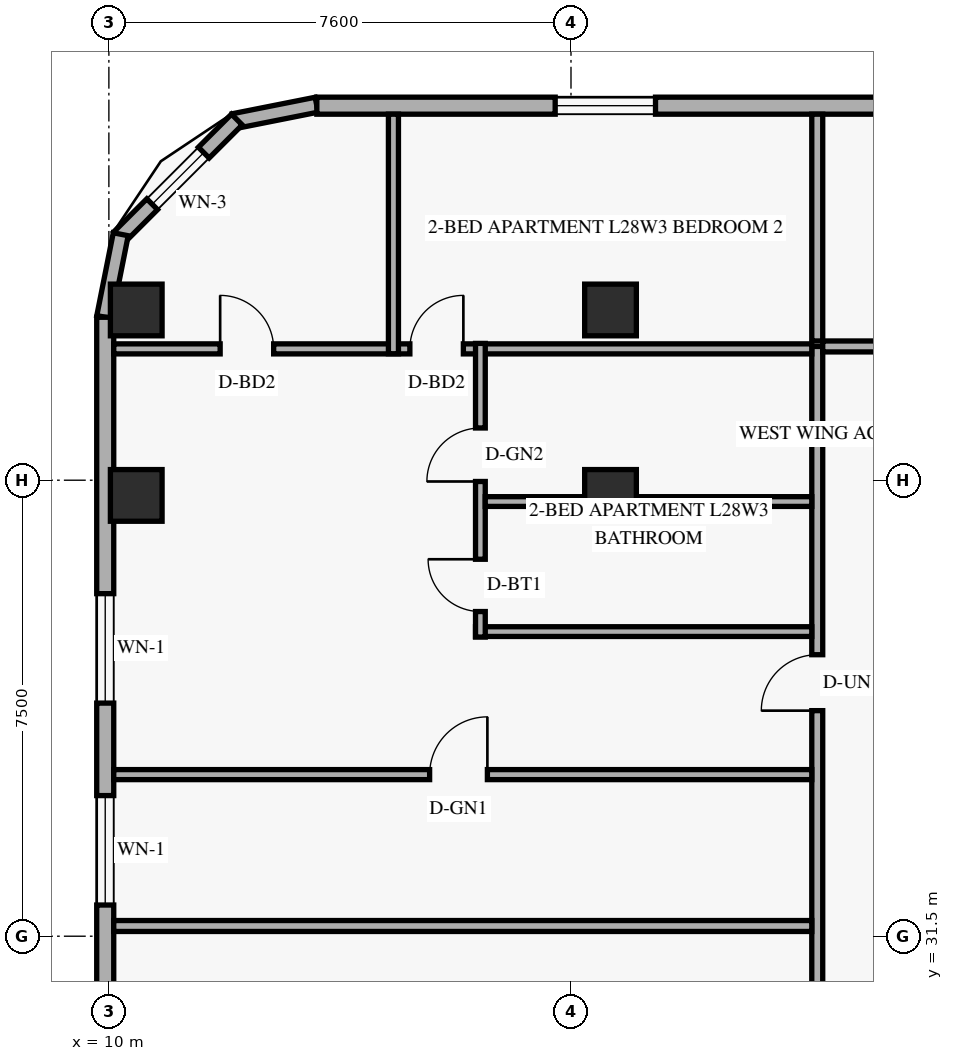
"""IFC4 building model, lengths in metres.
Left out: names, types, materials, properties, quantities, classifications, styles, units other than length and angle.
Written with IfcOpenShell. Run it as: python <this file> out.ifc"""

import sys

from ifc_helpers import new_model, si_unit, direction, frame, frame_2d, origin, origin_2d, place, context, subcontext, project, spatial, rectangle, extrude, element, fill, save


model = new_model("IFC4")
c1 = context("Model", 3, precision=1e-05, world=origin(), true_north=direction((0.0, 1.0)))
c2 = subcontext(c1, "Body", "Model", "MODEL_VIEW")
j1 = project(units=[si_unit("LENGTHUNIT", "METRE"), si_unit("PLANEANGLEUNIT", "RADIAN")], contexts=[c1])
p1 = place(None, origin())
s1 = spatial("IfcSite", under=j1, at=p1, CompositionType="ELEMENT")
p2 = place(p1, origin())
s2 = spatial("IfcBuilding", under=s1, at=p2, CompositionType="ELEMENT")
p3 = place(p2, frame((0.0, 0.0, 109.8)))
s3 = spatial("IfcBuildingStorey", under=s2, at=p3, CompositionType="ELEMENT", Elevation=109.8)
for number, where, z_axis, x_axis in (
    (1, (10.45, 38.75, 0.0), (0.0, 0.0, 1.0), (1.0, 0.0, 0.0)),
    (2, (10.45, 41.8, 0.0), (0.0, 0.0, 1.0), (1.0, 0.0, 0.0)),
    (3, (18.25, 38.75, 0.0), (0.0, 0.0, 1.0), (1.0, 0.0, 0.0)),
    (4, (18.25, 41.8, 0.0), (0.0, 0.0, 1.0), (1.0, 0.0, 0.0)),
):
    element("IfcColumn", number, at=place(p3, frame(where, z_axis=z_axis, x_axis=x_axis)), inside=s3, PredefinedType="COLUMN", context=c2, shape_type="SweptSolid", body=[
        extrude(rectangle(XDim=0.85, YDim=0.85, at=origin_2d()), origin(), (0.0, 0.0, 1.0), 3.6),
    ])
p4 = place(p3, frame((13.417, 45.176, 0.0), z_axis=(0.0, 0.0, 1.0), x_axis=(-0.980809899341, -0.19496651342, 0.0)))
e5 = element("IfcWall", 5, at=p4, inside=s3, PredefinedType="SOLIDWALL", context=c2, shape_type="SweptSolid", body=[
    extrude(rectangle(XDim=1.389, YDim=0.25, at=frame_2d((0.694, 0.0))), origin(), (0.0, 0.0, 1.0), 3.36),
])
p5 = place(p3, frame((12.105, 44.932, 0.0), z_axis=(0.0, 0.0, 1.0), x_axis=(-0.707151344399, -0.707062215165, 0.0)))
e6 = element("IfcWall", 6, at=p5, inside=s3, PredefinedType="SOLIDWALL", context=c2, shape_type="SweptSolid", body=[
    extrude(rectangle(XDim=2.739, YDim=0.25, at=frame_2d((1.37, 0.0))), origin(), (0.0, 0.0, 1.0), 3.36),
])
p6 = place(p5, frame((0.77, 0.0, 0.85)))
e7 = element("IfcOpeningElement", 7, at=p6, cuts=e6, PredefinedType="OPENING", context=c2, shape_type="SweptSolid", body=[
    extrude(rectangle(XDim=1.2, YDim=1.5, at=frame_2d((0.6, 0.75))), frame((0.0, 0.135, 0.0), z_axis=(0.0, -1.0, 0.0), x_axis=(1.0, 0.0, 0.0)), (0.0, 0.0, 1.0), 0.27),
])
p7 = place(p3, frame((10.195, 43.045, 0.0), z_axis=(0.0, 0.0, 1.0), x_axis=(-0.195000137217, -0.980803214965, 0.0)))
e8 = element("IfcWall", 8, at=p7, inside=s3, PredefinedType="SOLIDWALL", context=c2, shape_type="SweptSolid", body=[
    extrude(rectangle(XDim=1.388, YDim=0.25, at=frame_2d((0.694, 0.0))), origin(), (0.0, 0.0, 1.0), 3.36),
])
p8 = place(p3, frame((49.98, 45.16, 0.0), z_axis=(0.0, 0.0, 1.0), x_axis=(-1.0, 0.0, 0.0)))
e9 = element("IfcWall", 9, at=p8, inside=s3, PredefinedType="SOLIDWALL", context=c2, shape_type="SweptSolid", body=[
    extrude(rectangle(XDim=36.56, YDim=0.28, at=frame_2d((18.28, 0.0))), origin(), (0.0, 0.0, 1.0), 3.36),
])
p9 = place(p8, frame((30.99, 0.0, 0.85)))
e10 = element("IfcOpeningElement", 10, at=p9, cuts=e9, PredefinedType="OPENING", context=c2, shape_type="SweptSolid", body=[
    extrude(rectangle(XDim=1.65, YDim=1.6, at=frame_2d((0.825, 0.8))), frame((0.0, 0.15, 0.0), z_axis=(0.0, -1.0, 0.0), x_axis=(1.0, 0.0, 0.0)), (0.0, 0.0, 1.0), 0.3),
])
p10 = place(p8, frame((23.13, 0.0, 0.85)))
e11 = element("IfcOpeningElement", 11, at=p10, cuts=e9, PredefinedType="OPENING", context=c2, shape_type="SweptSolid", body=[
    extrude(rectangle(XDim=1.65, YDim=1.6, at=frame_2d((0.825, 0.8))), frame((0.0, 0.15, 0.0), z_axis=(0.0, -1.0, 0.0), x_axis=(1.0, 0.0, 0.0)), (0.0, 0.0, 1.0), 0.3),
])
p11 = place(p8, frame((16.245, 0.0, 0.85)))
e12 = element("IfcOpeningElement", 12, at=p11, cuts=e9, PredefinedType="OPENING", context=c2, shape_type="SweptSolid", body=[
    extrude(rectangle(XDim=1.65, YDim=1.6, at=frame_2d((0.825, 0.8))), frame((0.0, 0.15, 0.0), z_axis=(0.0, -1.0, 0.0), x_axis=(1.0, 0.0, 0.0)), (0.0, 0.0, 1.0), 0.3),
])
p12 = place(p8, frame((10.64, 0.0, 0.85)))
e13 = element("IfcOpeningElement", 13, at=p12, cuts=e9, PredefinedType="OPENING", context=c2, shape_type="SweptSolid", body=[
    extrude(rectangle(XDim=1.65, YDim=1.6, at=frame_2d((0.825, 0.8))), frame((0.0, 0.15, 0.0), z_axis=(0.0, -1.0, 0.0), x_axis=(1.0, 0.0, 0.0)), (0.0, 0.0, 1.0), 0.3),
])
p13 = place(p8, frame((5.55, 0.0, 0.85)))
e14 = element("IfcOpeningElement", 14, at=p13, cuts=e9, PredefinedType="OPENING", context=c2, shape_type="SweptSolid", body=[
    extrude(rectangle(XDim=1.65, YDim=1.6, at=frame_2d((0.825, 0.8))), frame((0.0, 0.15, 0.0), z_axis=(0.0, -1.0, 0.0), x_axis=(1.0, 0.0, 0.0)), (0.0, 0.0, 1.0), 0.3),
])
p14 = place(p8, frame((2.88, 0.0, 0.85)))
e15 = element("IfcOpeningElement", 15, at=p14, cuts=e9, PredefinedType="OPENING", context=c2, shape_type="SweptSolid", body=[
    extrude(rectangle(XDim=1.2, YDim=1.5, at=frame_2d((0.6, 0.75))), frame((0.0, 0.15, 0.0), z_axis=(0.0, -1.0, 0.0), x_axis=(1.0, 0.0, 0.0)), (0.0, 0.0, 1.0), 0.3),
])
p15 = place(p8, frame((0.465, 0.0, 0.85)))
e16 = element("IfcOpeningElement", 16, at=p15, cuts=e9, PredefinedType="OPENING", context=c2, shape_type="SweptSolid", body=[
    extrude(rectangle(XDim=1.65, YDim=1.6, at=frame_2d((0.825, 0.8))), frame((0.0, 0.15, 0.0), z_axis=(0.0, -1.0, 0.0), x_axis=(1.0, 0.0, 0.0)), (0.0, 0.0, 1.0), 0.3),
])
p16 = place(p3, frame((9.94, 41.68, 0.0), z_axis=(0.0, 0.0, 1.0), x_axis=(0.0, -1.0, 0.0)))
e17 = element("IfcWall", 17, at=p16, inside=s3, PredefinedType="SOLIDWALL", context=c2, shape_type="SweptSolid", body=[
    extrude(rectangle(XDim=35.36, YDim=0.28, at=frame_2d((17.68, 0.0))), origin(), (0.0, 0.0, 1.0), 3.36),
])
p17 = place(p16, frame((28.691, 0.0, 0.85)))
e18 = element("IfcOpeningElement", 18, at=p17, cuts=e17, PredefinedType="OPENING", context=c2, shape_type="SweptSolid", body=[
    extrude(rectangle(XDim=1.8, YDim=1.6, at=frame_2d((0.9, 0.8))), frame((0.0, 0.15, 0.0), z_axis=(0.0, -1.0, 0.0), x_axis=(1.0, 0.0, 0.0)), (0.0, 0.0, 1.0), 0.3),
])
p18 = place(p16, frame((24.981, 0.0, 0.85)))
e19 = element("IfcOpeningElement", 19, at=p18, cuts=e17, PredefinedType="OPENING", context=c2, shape_type="SweptSolid", body=[
    extrude(rectangle(XDim=1.8, YDim=1.6, at=frame_2d((0.9, 0.8))), frame((0.0, 0.15, 0.0), z_axis=(0.0, -1.0, 0.0), x_axis=(1.0, 0.0, 0.0)), (0.0, 0.0, 1.0), 0.3),
])
p19 = place(p16, frame((20.248, 0.0, 0.85)))
e20 = element("IfcOpeningElement", 20, at=p19, cuts=e17, PredefinedType="OPENING", context=c2, shape_type="SweptSolid", body=[
    extrude(rectangle(XDim=1.8, YDim=1.6, at=frame_2d((0.9, 0.8))), frame((0.0, 0.15, 0.0), z_axis=(0.0, -1.0, 0.0), x_axis=(1.0, 0.0, 0.0)), (0.0, 0.0, 1.0), 0.3),
])
p20 = place(p16, frame((14.363, 0.0, 0.85)))
e21 = element("IfcOpeningElement", 21, at=p20, cuts=e17, PredefinedType="OPENING", context=c2, shape_type="SweptSolid", body=[
    extrude(rectangle(XDim=1.8, YDim=1.6, at=frame_2d((0.9, 0.8))), frame((0.0, 0.15, 0.0), z_axis=(0.0, -1.0, 0.0), x_axis=(1.0, 0.0, 0.0)), (0.0, 0.0, 1.0), 0.3),
])
p21 = place(p16, frame((7.867, 0.0, 0.85)))
e22 = element("IfcOpeningElement", 22, at=p21, cuts=e17, PredefinedType="OPENING", context=c2, shape_type="SweptSolid", body=[
    extrude(rectangle(XDim=1.8, YDim=1.6, at=frame_2d((0.9, 0.8))), frame((0.0, 0.15, 0.0), z_axis=(0.0, -1.0, 0.0), x_axis=(1.0, 0.0, 0.0)), (0.0, 0.0, 1.0), 0.3),
])
p22 = place(p16, frame((4.546, 0.0, 0.85)))
e23 = element("IfcOpeningElement", 23, at=p22, cuts=e17, PredefinedType="OPENING", context=c2, shape_type="SweptSolid", body=[
    extrude(rectangle(XDim=1.8, YDim=1.6, at=frame_2d((0.9, 0.8))), frame((0.0, 0.15, 0.0), z_axis=(0.0, -1.0, 0.0), x_axis=(1.0, 0.0, 0.0)), (0.0, 0.0, 1.0), 0.3),
])
p23 = place(p3, frame((21.65, 6.8, 0.0), z_axis=(0.0, 0.0, 1.0), x_axis=(0.0, 1.0, 0.0)))
e24 = element("IfcWall", 24, at=p23, inside=s3, PredefinedType="STANDARD", context=c2, shape_type="SweptSolid", body=[
    extrude(rectangle(XDim=34.4, YDim=0.18, at=frame_2d((17.2, 0.0))), origin(), (0.0, 0.0, 1.0), 2.731),
])
p24 = place(p23, frame((4.785, 0.0, 0.0)))
e25 = element("IfcOpeningElement", 25, at=p24, cuts=e24, PredefinedType="OPENING", context=c2, shape_type="SweptSolid", body=[
    extrude(rectangle(XDim=0.92, YDim=2.15, at=frame_2d((0.46, 1.075))), frame((0.0, 0.1, 0.0), z_axis=(0.0, -1.0, 0.0), x_axis=(1.0, 0.0, 0.0)), (0.0, 0.0, 1.0), 0.2),
])
p25 = place(p23, frame((15.384, 0.0, 0.0)))
e26 = element("IfcOpeningElement", 26, at=p25, cuts=e24, PredefinedType="OPENING", context=c2, shape_type="SweptSolid", body=[
    extrude(rectangle(XDim=0.92, YDim=2.15, at=frame_2d((0.46, 1.075))), frame((0.0, 0.1, 0.0), z_axis=(0.0, -1.0, 0.0), x_axis=(1.0, 0.0, 0.0)), (0.0, 0.0, 1.0), 0.2),
])
p26 = place(p23, frame((28.41, 0.0, 0.0)))
e27 = element("IfcOpeningElement", 27, at=p26, cuts=e24, PredefinedType="OPENING", context=c2, shape_type="SweptSolid", body=[
    extrude(rectangle(XDim=0.92, YDim=2.15, at=frame_2d((0.46, 1.075))), frame((0.0, 0.1, 0.0), z_axis=(0.0, -1.0, 0.0), x_axis=(1.0, 0.0, 0.0)), (0.0, 0.0, 1.0), 0.2),
])
p27 = place(p3, frame((21.74, 41.2, 0.0), z_axis=(0.0, 0.0, 1.0), x_axis=(1.0, 0.0, 0.0)))
e28 = element("IfcWall", 28, at=p27, inside=s3, PredefinedType="STANDARD", context=c2, shape_type="SweptSolid", body=[
    extrude(rectangle(XDim=13.68, YDim=0.18, at=frame_2d((6.84, 0.0))), origin(), (0.0, 0.0, 1.0), 2.731),
])
p28 = place(p27, frame((3.09, 0.0, 0.0)))
e29 = element("IfcOpeningElement", 29, at=p28, cuts=e28, PredefinedType="OPENING", context=c2, shape_type="SweptSolid", body=[
    extrude(rectangle(XDim=0.95, YDim=2.15, at=frame_2d((0.475, 1.075))), frame((0.0, 0.1, 0.0), z_axis=(0.0, -1.0, 0.0), x_axis=(1.0, 0.0, 0.0)), (0.0, 0.0, 1.0), 0.2),
])
p29 = place(p27, frame((10.11, 0.0, 0.0)))
e30 = element("IfcOpeningElement", 30, at=p29, cuts=e28, PredefinedType="OPENING", context=c2, shape_type="SweptSolid", body=[
    extrude(rectangle(XDim=0.95, YDim=2.15, at=frame_2d((0.475, 1.075))), frame((0.0, 0.1, 0.0), z_axis=(0.0, -1.0, 0.0), x_axis=(1.0, 0.0, 0.0)), (0.0, 0.0, 1.0), 0.2),
])
p30 = place(p3, frame((21.65, 41.29, 0.0), z_axis=(0.0, 0.0, 1.0), x_axis=(0.0, 1.0, 0.0)))
e31 = element("IfcWall", 31, at=p30, inside=s3, PredefinedType="PARTITIONING", context=c2, shape_type="SweptSolid", body=[
    extrude(rectangle(XDim=3.73, YDim=0.18, at=frame_2d((1.865, 0.0))), origin(), (0.0, 0.0, 1.0), 2.809),
])
p31 = place(p3, frame((10.08, 31.668, 0.0), z_axis=(0.0, 0.0, 1.0), x_axis=(1.0, 0.0, 0.0)))
e32 = element("IfcWall", 32, at=p31, inside=s3, PredefinedType="PARTITIONING", context=c2, shape_type="SweptSolid", body=[
    extrude(rectangle(XDim=11.48, YDim=0.18, at=frame_2d((5.74, 0.0))), origin(), (0.0, 0.0, 1.0), 2.731),
])
p32 = place(p3, frame((10.08, 41.16, 0.0), z_axis=(0.0, 0.0, 1.0), x_axis=(1.0, 0.0, 0.0)))
e33 = element("IfcWall", 33, at=p32, inside=s3, PredefinedType="PARTITIONING", context=c2, shape_type="SweptSolid", body=[
    extrude(rectangle(XDim=11.48, YDim=0.165, at=frame_2d((5.74, 0.0))), origin(), (0.0, 0.0, 1.0), 2.731),
])
p33 = place(p32, frame((1.75, 0.0, 0.0)))
e34 = element("IfcOpeningElement", 34, at=p33, cuts=e33, PredefinedType="OPENING", context=c2, shape_type="SweptSolid", body=[
    extrude(rectangle(XDim=0.88, YDim=2.14, at=frame_2d((0.44, 1.07))), frame((0.0, 0.093, 0.0), z_axis=(0.0, -1.0, 0.0), x_axis=(1.0, 0.0, 0.0)), (0.0, 0.0, 1.0), 0.185),
])
p34 = place(p32, frame((4.87, 0.0, 0.0)))
e35 = element("IfcOpeningElement", 35, at=p34, cuts=e33, PredefinedType="OPENING", context=c2, shape_type="SweptSolid", body=[
    extrude(rectangle(XDim=0.88, YDim=2.14, at=frame_2d((0.44, 1.07))), frame((0.0, 0.093, 0.0), z_axis=(0.0, -1.0, 0.0), x_axis=(1.0, 0.0, 0.0)), (0.0, 0.0, 1.0), 0.185),
])
p35 = place(p3, frame((16.03, 36.51, 0.0), z_axis=(0.0, 0.0, 1.0), x_axis=(1.0, 0.0, 0.0)))
e36 = element("IfcWall", 36, at=p35, inside=s3, PredefinedType="PLUMBINGWALL", context=c2, shape_type="SweptSolid", body=[
    extrude(rectangle(XDim=5.53, YDim=0.16, at=frame_2d((2.765, 0.0))), origin(), (0.0, 0.0, 1.0), 2.731),
])
p36 = place(p3, frame((16.11, 36.42, 0.0), z_axis=(0.0, 0.0, 1.0), x_axis=(0.0, 1.0, 0.0)))
e37 = element("IfcWall", 37, at=p36, inside=s3, PredefinedType="PLUMBINGWALL", context=c2, shape_type="SweptSolid", body=[
    extrude(rectangle(XDim=4.83, YDim=0.16, at=frame_2d((2.415, 0.0))), origin(), (0.0, 0.0, 1.0), 2.731),
])
p37 = place(p36, frame((0.42, 0.0, 0.0)))
e38 = element("IfcOpeningElement", 38, at=p37, cuts=e37, PredefinedType="OPENING", context=c2, shape_type="SweptSolid", body=[
    extrude(rectangle(XDim=0.86, YDim=2.12, at=frame_2d((0.43, 1.06))), frame((0.0, 0.09, 0.0), z_axis=(0.0, -1.0, 0.0), x_axis=(1.0, 0.0, 0.0)), (0.0, 0.0, 1.0), 0.18),
])
p38 = place(p36, frame((2.559, 0.0, 0.0)))
e39 = element("IfcOpeningElement", 39, at=p38, cuts=e37, PredefinedType="OPENING", context=c2, shape_type="SweptSolid", body=[
    extrude(rectangle(XDim=0.88, YDim=2.12, at=frame_2d((0.44, 1.06))), frame((0.0, 0.09, 0.0), z_axis=(0.0, -1.0, 0.0), x_axis=(1.0, 0.0, 0.0)), (0.0, 0.0, 1.0), 0.18),
])
p39 = place(p3, frame((16.19, 38.649, 0.0), z_axis=(0.0, 0.0, 1.0), x_axis=(1.0, 0.0, 0.0)))
e40 = element("IfcWall", 40, at=p39, inside=s3, PredefinedType="PLUMBINGWALL", context=c2, shape_type="SweptSolid", body=[
    extrude(rectangle(XDim=5.37, YDim=0.16, at=frame_2d((2.685, 0.0))), origin(), (0.0, 0.0, 1.0), 2.731),
])
p40 = place(p3, frame((10.08, 34.158, 0.0), z_axis=(0.0, 0.0, 1.0), x_axis=(1.0, 0.0, 0.0)))
e41 = element("IfcWall", 41, at=p40, inside=s3, PredefinedType="PARTITIONING", context=c2, shape_type="SweptSolid", body=[
    extrude(rectangle(XDim=11.48, YDim=0.165, at=frame_2d((5.74, 0.0))), origin(), (0.0, 0.0, 1.0), 2.731),
])
p41 = place(p40, frame((5.195, 0.0, 0.0)))
e42 = element("IfcOpeningElement", 42, at=p41, cuts=e41, PredefinedType="OPENING", context=c2, shape_type="SweptSolid", body=[
    extrude(rectangle(XDim=0.95, YDim=2.15, at=frame_2d((0.475, 1.075))), frame((0.0, 0.093, 0.0), z_axis=(0.0, -1.0, 0.0), x_axis=(1.0, 0.0, 0.0)), (0.0, 0.0, 1.0), 0.185),
])
p42 = place(p3, frame((14.68, 41.08, 0.0), z_axis=(0.0, 0.0, 1.0), x_axis=(0.0, 1.0, 0.0)))
e43 = element("IfcWall", 43, at=p42, inside=s3, PredefinedType="PARTITIONING", context=c2, shape_type="SweptSolid", body=[
    extrude(rectangle(XDim=3.94, YDim=0.165, at=frame_2d((1.97, 0.0))), origin(), (0.0, 0.0, 1.0), 2.809),
])
p43 = place(p6, origin())
e44 = element("IfcWindow", 44, at=p43, inside=s3, PartitioningType="SINGLE_PANEL", PredefinedType="WINDOW", context=c2, shape_type="SweptSolid", body=[
    extrude(rectangle(XDim=1.2, YDim=1.5, at=frame_2d((0.6, 0.75))), frame((0.0, 0.03, 0.0), z_axis=(0.0, -1.0, 0.0), x_axis=(1.0, 0.0, 0.0)), (0.0, 0.0, 1.0), 0.06),
])
fill(e7, e44)
p44 = place(p9, origin())
e45 = element("IfcWindow", 45, at=p44, inside=s3, PartitioningType="SINGLE_PANEL", PredefinedType="WINDOW", context=c2, shape_type="SweptSolid", body=[
    extrude(rectangle(XDim=1.65, YDim=1.6, at=frame_2d((0.825, 0.8))), frame((0.0, 0.03, 0.0), z_axis=(0.0, -1.0, 0.0), x_axis=(1.0, 0.0, 0.0)), (0.0, 0.0, 1.0), 0.06),
])
fill(e10, e45)
p45 = place(p21, origin())
e46 = element("IfcWindow", 46, at=p45, inside=s3, PartitioningType="SINGLE_PANEL", PredefinedType="WINDOW", context=c2, shape_type="SweptSolid", body=[
    extrude(rectangle(XDim=1.8, YDim=1.6, at=frame_2d((0.9, 0.8))), frame((0.0, 0.03, 0.0), z_axis=(0.0, -1.0, 0.0), x_axis=(1.0, 0.0, 0.0)), (0.0, 0.0, 1.0), 0.06),
])
fill(e22, e46)
p46 = place(p22, origin())
e47 = element("IfcWindow", 47, at=p46, inside=s3, PartitioningType="SINGLE_PANEL", PredefinedType="WINDOW", context=c2, shape_type="SweptSolid", body=[
    extrude(rectangle(XDim=1.8, YDim=1.6, at=frame_2d((0.9, 0.8))), frame((0.0, 0.03, 0.0), z_axis=(0.0, -1.0, 0.0), x_axis=(1.0, 0.0, 0.0)), (0.0, 0.0, 1.0), 0.06),
])
fill(e23, e47)
p47 = place(p41, origin())
e48 = element("IfcDoor", 48, at=p47, inside=s3, OperationType="SINGLE_SWING_RIGHT", PredefinedType="DOOR", context=c2, shape_type="SweptSolid", body=[
    extrude(rectangle(XDim=0.95, YDim=2.15, at=frame_2d((0.475, 1.075))), frame((0.0, 0.025, 0.0), z_axis=(0.0, -1.0, 0.0), x_axis=(1.0, 0.0, 0.0)), (0.0, 0.0, 1.0), 0.05),
])
fill(e42, e48)
p48 = place(p26, origin())
e49 = element("IfcDoor", 49, at=p48, inside=s3, OperationType="SINGLE_SWING_LEFT", PredefinedType="DOOR", context=c2, shape_type="SweptSolid", body=[
    extrude(rectangle(XDim=0.92, YDim=2.15, at=frame_2d((0.46, 1.075))), frame((0.0, 0.025, 0.0), z_axis=(0.0, -1.0, 0.0), x_axis=(1.0, 0.0, 0.0)), (0.0, 0.0, 1.0), 0.05),
])
fill(e27, e49)
p49 = place(p37, origin())
e50 = element("IfcDoor", 50, at=p49, inside=s3, OperationType="SINGLE_SWING_RIGHT", PredefinedType="DOOR", context=c2, shape_type="SweptSolid", body=[
    extrude(rectangle(XDim=0.86, YDim=2.12, at=frame_2d((0.43, 1.06))), frame((0.0, 0.025, 0.0), z_axis=(0.0, -1.0, 0.0), x_axis=(1.0, 0.0, 0.0)), (0.0, 0.0, 1.0), 0.05),
])
fill(e38, e50)
p50 = place(p38, origin())
e51 = element("IfcDoor", 51, at=p50, inside=s3, OperationType="SINGLE_SWING_LEFT", PredefinedType="DOOR", context=c2, shape_type="SweptSolid", body=[
    extrude(rectangle(XDim=0.88, YDim=2.12, at=frame_2d((0.44, 1.06))), frame((0.0, 0.025, 0.0), z_axis=(0.0, -1.0, 0.0), x_axis=(1.0, 0.0, 0.0)), (0.0, 0.0, 1.0), 0.05),
])
fill(e39, e51)
p51 = place(p33, origin())
e52 = element("IfcDoor", 52, at=p51, inside=s3, OperationType="SINGLE_SWING_LEFT", PredefinedType="DOOR", context=c2, shape_type="SweptSolid", body=[
    extrude(rectangle(XDim=0.88, YDim=2.14, at=frame_2d((0.44, 1.07))), frame((0.0, 0.025, 0.0), z_axis=(0.0, -1.0, 0.0), x_axis=(1.0, 0.0, 0.0)), (0.0, 0.0, 1.0), 0.05),
])
fill(e34, e52)
p52 = place(p34, origin())
e53 = element("IfcDoor", 53, at=p52, inside=s3, OperationType="SINGLE_SWING_RIGHT", PredefinedType="DOOR", context=c2, shape_type="SweptSolid", body=[
    extrude(rectangle(XDim=0.88, YDim=2.14, at=frame_2d((0.44, 1.07))), frame((0.0, 0.025, 0.0), z_axis=(0.0, -1.0, 0.0), x_axis=(1.0, 0.0, 0.0)), (0.0, 0.0, 1.0), 0.05),
])
fill(e35, e53)
save(model, sys.argv[1])
